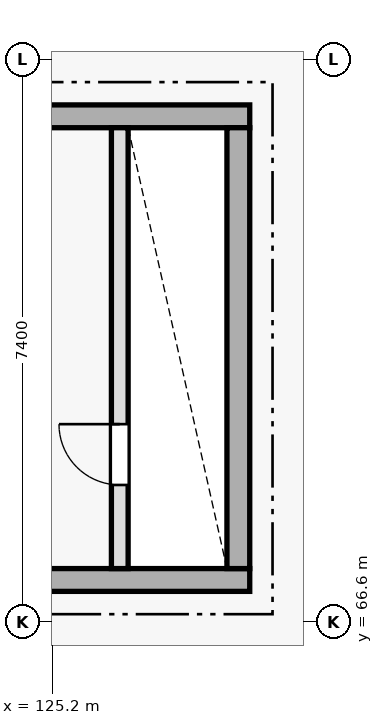
"""IFC4 building model, lengths in metres.
Left out: names, types, materials, properties, quantities, classifications, styles, units other than length and angle.
Written with IfcOpenShell. Run it as: python <this file> out.ifc"""

import sys

from ifc_helpers import new_model, si_unit, direction, frame, frame_2d, origin, place, context, subcontext, project, spatial, rectangle, extrude, element, fill, save


model = new_model("IFC4")
c1 = context("Model", 3, precision=1e-05, world=origin(), true_north=direction((0.0, 1.0)))
c2 = subcontext(c1, "Body", "Model", "MODEL_VIEW")
j1 = project(units=[si_unit("LENGTHUNIT", "METRE"), si_unit("PLANEANGLEUNIT", "RADIAN")], contexts=[c1])
p1 = place(None, origin())
s1 = spatial("IfcSite", under=j1, at=p1, CompositionType="ELEMENT")
p2 = place(p1, origin())
s2 = spatial("IfcBuilding", under=s1, at=p2, CompositionType="ELEMENT")
p3 = place(p2, frame((0.0, 0.0, 5.4)))
s3 = spatial("IfcBuildingStorey", under=s2, at=p3, CompositionType="ELEMENT", Elevation=5.4)
p4 = place(p3, frame((113.4, 67.15, 0.0), z_axis=(0.0, 0.0, 1.0), x_axis=(1.0, 0.0, 0.0)))
e1 = element("IfcWall", 1, at=p4, inside=s3, PredefinedType="SHEAR", context=c2, shape_type="SweptSolid", body=[
    extrude(rectangle(XDim=14.4, YDim=0.3, at=frame_2d((7.2, 0.0))), origin(), (0.0, 0.0, 1.0), 4.495),
])
p5 = place(p4, frame((9.95, 0.0, 0.0)))
e2 = element("IfcOpeningElement", 2, at=p5, cuts=e1, PredefinedType="OPENING", context=c2, shape_type="SweptSolid", body=[
    extrude(rectangle(XDim=1.3, YDim=2.2, at=frame_2d((0.65, 1.1))), frame((0.0, 0.16, 0.0), z_axis=(0.0, -1.0, 0.0), x_axis=(1.0, 0.0, 0.0)), (0.0, 0.0, 1.0), 0.32),
])
p6 = place(p3, frame((113.4, 73.25, 0.0), z_axis=(0.0, 0.0, 1.0), x_axis=(1.0, 0.0, 0.0)))
e3 = element("IfcWall", 3, at=p6, inside=s3, PredefinedType="SHEAR", context=c2, shape_type="SweptSolid", body=[
    extrude(rectangle(XDim=14.4, YDim=0.3, at=frame_2d((7.2, 0.0))), origin(), (0.0, 0.0, 1.0), 4.495),
])
p7 = place(p3, frame((127.65, 67.3, 0.0), z_axis=(0.0, 0.0, 1.0), x_axis=(0.0, 1.0, 0.0)))
e4 = element("IfcWall", 4, at=p7, inside=s3, PredefinedType="SHEAR", context=c2, shape_type="SweptSolid", body=[
    extrude(rectangle(XDim=5.8, YDim=0.3, at=frame_2d((2.9, 0.0))), origin(), (0.0, 0.0, 1.0), 4.495),
])
p8 = place(p3, frame((126.09, 67.3, 0.0), z_axis=(0.0, 0.0, 1.0), x_axis=(0.0, 1.0, 0.0)))
e5 = element("IfcWall", 5, at=p8, inside=s3, PredefinedType="PLUMBINGWALL", context=c2, shape_type="SweptSolid", body=[
    extrude(rectangle(XDim=5.8, YDim=0.22, at=frame_2d((2.9, 0.0))), origin(), (0.0, 0.0, 1.0), 4.2),
])
p9 = place(p8, frame((1.1, 0.0, 0.0)))
e6 = element("IfcOpeningElement", 6, at=p9, cuts=e5, PredefinedType="OPENING", context=c2, shape_type="SweptSolid", body=[
    extrude(rectangle(XDim=0.8, YDim=2.1, at=frame_2d((0.4, 1.05))), frame((0.0, 0.12, 0.0), z_axis=(0.0, -1.0, 0.0), x_axis=(1.0, 0.0, 0.0)), (0.0, 0.0, 1.0), 0.24),
])
p10 = place(p9, origin())
e7 = element("IfcDoor", 7, at=p10, inside=s3, OperationType="SINGLE_SWING_RIGHT", PredefinedType="DOOR", context=c2, shape_type="SweptSolid", body=[
    extrude(rectangle(XDim=0.8, YDim=2.1, at=frame_2d((0.4, 1.05))), frame((0.0, 0.025, 0.0), z_axis=(0.0, -1.0, 0.0), x_axis=(1.0, 0.0, 0.0)), (0.0, 0.0, 1.0), 0.05),
])
fill(e6, e7)
save(model, sys.argv[1])
